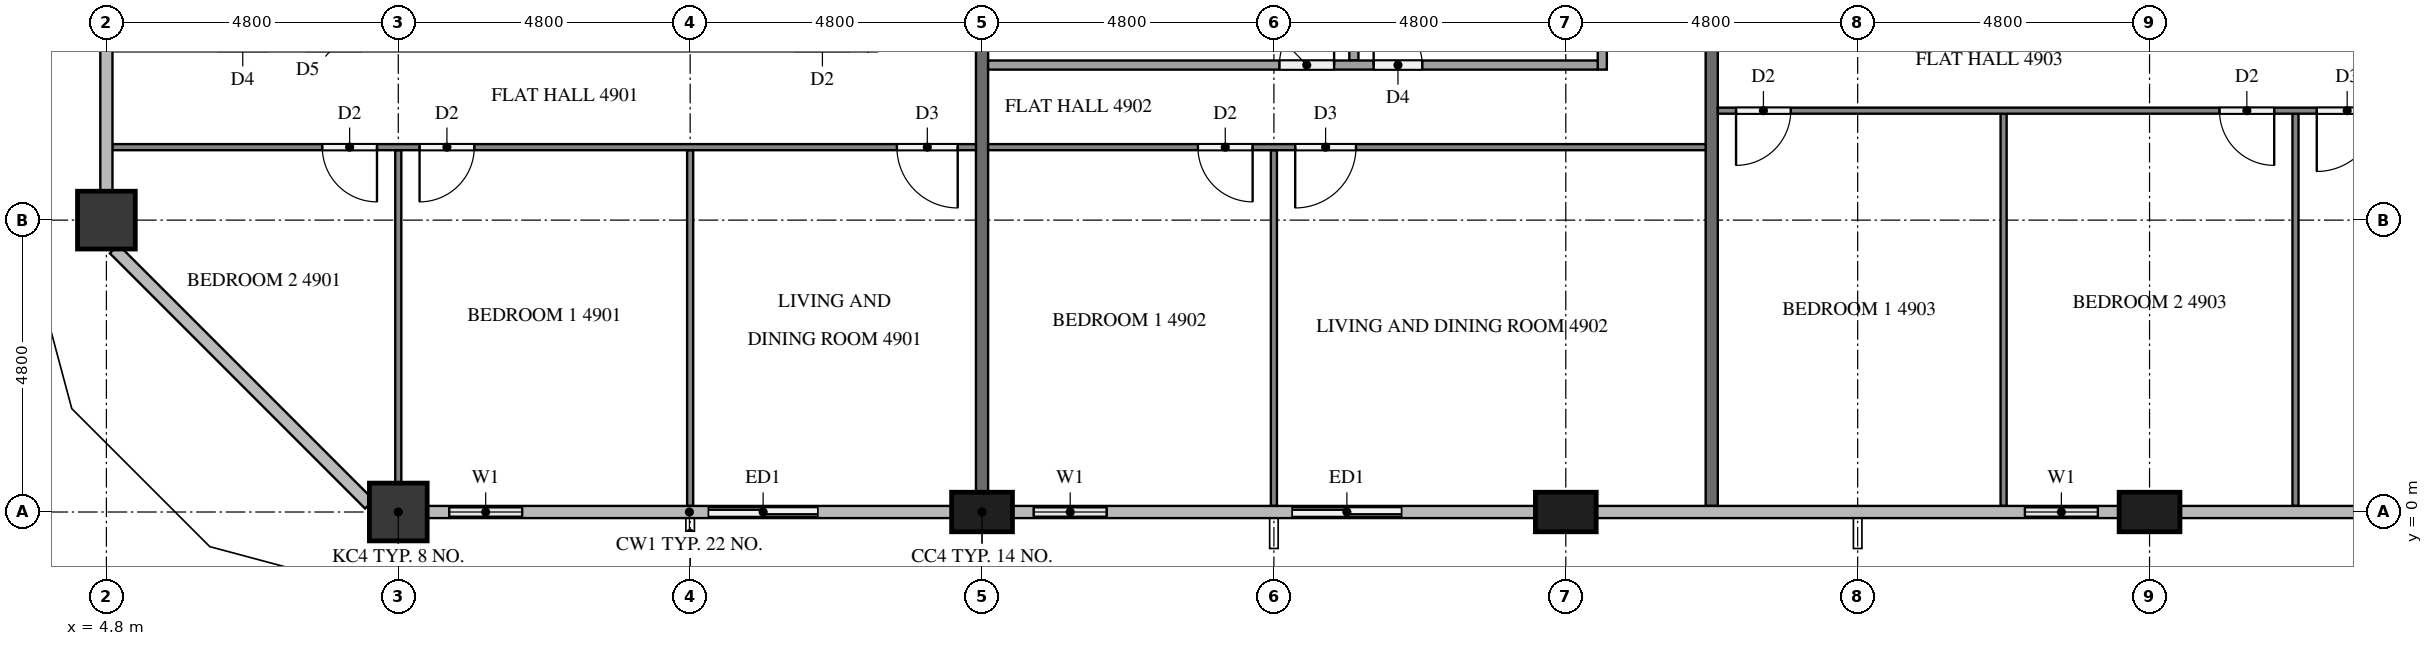
"""IFC4 building model, lengths in metres.
Left out: names, types, materials, properties, quantities, classifications, styles, units other than length and angle.
Written with IfcOpenShell. Run it as: python <this file> out.ifc"""

import sys

from ifc_helpers import new_model, si_unit, direction, frame, frame_2d, origin, origin_2d, place, context, subcontext, project, spatial, rectangle, extrude, element, fill, save


model = new_model("IFC4")
c1 = context("Model", 3, precision=1e-05, world=origin(), true_north=direction((0.0, 1.0)))
c2 = subcontext(c1, "Body", "Model", "MODEL_VIEW")
j1 = project(units=[si_unit("LENGTHUNIT", "METRE"), si_unit("PLANEANGLEUNIT", "RADIAN")], contexts=[c1])
p1 = place(None, origin())
s1 = spatial("IfcSite", under=j1, at=p1, CompositionType="ELEMENT")
p2 = place(p1, origin())
s2 = spatial("IfcBuilding", under=s1, at=p2, CompositionType="ELEMENT")
p3 = place(p2, frame((0.0, 0.0, 189.4)))
s3 = spatial("IfcBuildingStorey", under=s2, at=p3, CompositionType="ELEMENT", Elevation=189.4)
p4 = place(p3, frame((9.6, 0.0, 0.0), z_axis=(0.0, 0.0, 1.0), x_axis=(1.0, 0.0, 0.0)))
e1 = element("IfcColumn", 1, at=p4, inside=s3, PredefinedType="COLUMN", context=c2, shape_type="SweptSolid", body=[
    extrude(rectangle(XDim=0.95, YDim=0.95, at=origin_2d()), origin(), (0.0, 0.0, 1.0), 3.2),
])
for number, where, z_axis, x_axis in (
    (2, (19.2, 0.0, 0.0), (0.0, 0.0, 1.0), (1.0, 0.0, 0.0)),
    (3, (28.8, 0.0, 0.0), (0.0, 0.0, 1.0), (1.0, 0.0, 0.0)),
    (4, (38.4, 0.0, 0.0), (0.0, 0.0, 1.0), (1.0, 0.0, 0.0)),
):
    element("IfcColumn", number, at=place(p3, frame(where, z_axis=z_axis, x_axis=x_axis)), inside=s3, PredefinedType="COLUMN", context=c2, shape_type="SweptSolid", body=[
        extrude(rectangle(XDim=1.0, YDim=0.65, at=origin_2d()), origin(), (0.0, 0.0, 1.0), 3.2),
    ])
p5 = place(p3, frame((4.8, 4.8, 0.0), z_axis=(0.0, 0.0, 1.0), x_axis=(1.0, 0.0, 0.0)))
e5 = element("IfcColumn", 5, at=p5, inside=s3, PredefinedType="COLUMN", context=c2, shape_type="SweptSolid", body=[
    extrude(rectangle(XDim=0.95, YDim=0.95, at=origin_2d()), origin(), (0.0, 0.0, 1.0), 3.2),
])
p6 = place(p3, frame((10.075, 0.0, 0.0), z_axis=(0.0, 0.0, 1.0), x_axis=(1.0, 0.0, 0.0)))
e6 = element("IfcWall", 6, at=p6, inside=s3, PredefinedType="SOLIDWALL", context=c2, shape_type="SweptSolid", body=[
    extrude(rectangle(XDim=1.925, YDim=0.15, at=frame_2d((0.962, 0.0))), origin(), (0.0, 0.0, 1.0), 3.2),
])
p7 = place(p6, frame((0.363, 0.0, 0.9)))
e7 = element("IfcOpeningElement", 7, at=p7, cuts=e6, PredefinedType="OPENING", context=c2, shape_type="SweptSolid", body=[
    extrude(rectangle(XDim=1.2, YDim=1.4, at=frame_2d((0.6, 0.7))), frame((0.0, 0.085, 0.0), z_axis=(0.0, -1.0, 0.0), x_axis=(1.0, 0.0, 0.0)), (0.0, 0.0, 1.0), 0.17),
])
p8 = place(p3, frame((14.4, 0.0, 0.0), z_axis=(0.0, 0.0, 1.0), x_axis=(1.0, 0.0, 0.0)))
e8 = element("IfcWall", 8, at=p8, inside=s3, PredefinedType="SOLIDWALL", context=c2, shape_type="SweptSolid", body=[
    extrude(rectangle(XDim=2.4, YDim=0.15, at=frame_2d((1.2, 0.0))), origin(), (0.0, 0.0, 1.0), 3.2),
])
p9 = place(p8, frame((0.3, 0.0, 0.0)))
e9 = element("IfcOpeningElement", 9, at=p9, cuts=e8, PredefinedType="OPENING", context=c2, shape_type="SweptSolid", body=[
    extrude(rectangle(XDim=1.8, YDim=2.4, at=frame_2d((0.9, 1.2))), frame((0.0, 0.085, 0.0), z_axis=(0.0, -1.0, 0.0), x_axis=(1.0, 0.0, 0.0)), (0.0, 0.0, 1.0), 0.17),
])
p10 = place(p3, frame((19.7, 0.0, 0.0), z_axis=(0.0, 0.0, 1.0), x_axis=(1.0, 0.0, 0.0)))
e10 = element("IfcWall", 10, at=p10, inside=s3, PredefinedType="SOLIDWALL", context=c2, shape_type="SweptSolid", body=[
    extrude(rectangle(XDim=1.9, YDim=0.15, at=frame_2d((0.95, 0.0))), origin(), (0.0, 0.0, 1.0), 3.2),
])
p11 = place(p10, frame((0.35, 0.0, 0.9)))
e11 = element("IfcOpeningElement", 11, at=p11, cuts=e10, PredefinedType="OPENING", context=c2, shape_type="SweptSolid", body=[
    extrude(rectangle(XDim=1.2, YDim=1.4, at=frame_2d((0.6, 0.7))), frame((0.0, 0.085, 0.0), z_axis=(0.0, -1.0, 0.0), x_axis=(1.0, 0.0, 0.0)), (0.0, 0.0, 1.0), 0.17),
])
p12 = place(p3, frame((24.0, 0.0, 0.0), z_axis=(0.0, 0.0, 1.0), x_axis=(1.0, 0.0, 0.0)))
e12 = element("IfcWall", 12, at=p12, inside=s3, PredefinedType="SOLIDWALL", context=c2, shape_type="SweptSolid", body=[
    extrude(rectangle(XDim=2.4, YDim=0.15, at=frame_2d((1.2, 0.0))), origin(), (0.0, 0.0, 1.0), 3.2),
])
p13 = place(p12, frame((0.3, 0.0, 0.0)))
e13 = element("IfcOpeningElement", 13, at=p13, cuts=e12, PredefinedType="OPENING", context=c2, shape_type="SweptSolid", body=[
    extrude(rectangle(XDim=1.8, YDim=2.4, at=frame_2d((0.9, 1.2))), frame((0.0, 0.085, 0.0), z_axis=(0.0, -1.0, 0.0), x_axis=(1.0, 0.0, 0.0)), (0.0, 0.0, 1.0), 0.17),
])
p14 = place(p3, frame((36.0, 0.0, 0.0), z_axis=(0.0, 0.0, 1.0), x_axis=(1.0, 0.0, 0.0)))
e14 = element("IfcWall", 14, at=p14, inside=s3, PredefinedType="SOLIDWALL", context=c2, shape_type="SweptSolid", body=[
    extrude(rectangle(XDim=1.9, YDim=0.15, at=frame_2d((0.95, 0.0))), origin(), (0.0, 0.0, 1.0), 3.2),
])
p15 = place(p14, frame((0.35, 0.0, 0.9)))
e15 = element("IfcOpeningElement", 15, at=p15, cuts=e14, PredefinedType="OPENING", context=c2, shape_type="SweptSolid", body=[
    extrude(rectangle(XDim=1.2, YDim=1.4, at=frame_2d((0.6, 0.7))), frame((0.0, 0.085, 0.0), z_axis=(0.0, -1.0, 0.0), x_axis=(1.0, 0.0, 0.0)), (0.0, 0.0, 1.0), 0.17),
])
p16 = place(p3, frame((19.2, 11.9, 0.0), z_axis=(0.0, 0.0, 1.0), x_axis=(0.0, -1.0, 0.0)))
e16 = element("IfcWall", 16, at=p16, inside=s3, PredefinedType="PARTITIONING", context=c2, shape_type="SweptSolid", body=[
    extrude(rectangle(XDim=11.575, YDim=0.2, at=frame_2d((5.788, 0.0))), origin(), (0.0, 0.0, 1.0), 3.2),
])
p17 = place(p3, frame((31.2, 11.9, 0.0), z_axis=(0.0, 0.0, 1.0), x_axis=(0.0, -1.0, 0.0)))
e17 = element("IfcWall", 17, at=p17, inside=s3, PredefinedType="PARTITIONING", context=c2, shape_type="SweptSolid", body=[
    extrude(rectangle(XDim=11.8, YDim=0.2, at=frame_2d((5.9, 0.0))), origin(), (0.0, 0.0, 1.0), 3.2),
])
p18 = place(p3, frame((14.4, 5.95, 0.0), z_axis=(0.0, 0.0, 1.0), x_axis=(0.0, -1.0, 0.0)))
e18 = element("IfcWall", 18, at=p18, inside=s3, PredefinedType="PARTITIONING", context=c2, shape_type="SweptSolid", body=[
    extrude(rectangle(XDim=5.85, YDim=0.1, at=frame_2d((2.925, 0.0))), origin(), (0.0, 0.0, 1.0), 3.2),
])
p19 = place(p3, frame((9.6, 5.95, 0.0), z_axis=(0.0, 0.0, 1.0), x_axis=(0.0, -1.0, 0.0)))
e19 = element("IfcWall", 19, at=p19, inside=s3, PredefinedType="PARTITIONING", context=c2, shape_type="SweptSolid", body=[
    extrude(rectangle(XDim=5.475, YDim=0.1, at=frame_2d((2.737, 0.0))), origin(), (0.0, 0.0, 1.0), 3.2),
])
p20 = place(p3, frame((19.1, 6.0, 0.0), z_axis=(0.0, 0.0, 1.0), x_axis=(-1.0, 0.0, 0.0)))
e20 = element("IfcWall", 20, at=p20, inside=s3, PredefinedType="PARTITIONING", context=c2, shape_type="SweptSolid", body=[
    extrude(rectangle(XDim=14.2, YDim=0.1, at=frame_2d((7.1, 0.0))), origin(), (0.0, 0.0, 1.0), 3.2),
])
p21 = place(p20, frame((0.3, 0.0, 0.0)))
e21 = element("IfcOpeningElement", 21, at=p21, cuts=e20, PredefinedType="OPENING", context=c2, shape_type="SweptSolid", body=[
    extrude(rectangle(XDim=1.0, YDim=2.1, at=frame_2d((0.5, 1.05))), frame((0.0, 0.06, 0.0), z_axis=(0.0, -1.0, 0.0), x_axis=(1.0, 0.0, 0.0)), (0.0, 0.0, 1.0), 0.12),
])
p22 = place(p20, frame((8.25, 0.0, 0.0)))
e22 = element("IfcOpeningElement", 22, at=p22, cuts=e20, PredefinedType="OPENING", context=c2, shape_type="SweptSolid", body=[
    extrude(rectangle(XDim=0.9, YDim=2.1, at=frame_2d((0.45, 1.05))), frame((0.0, 0.06, 0.0), z_axis=(0.0, -1.0, 0.0), x_axis=(1.0, 0.0, 0.0)), (0.0, 0.0, 1.0), 0.12),
])
p23 = place(p20, frame((9.85, 0.0, 0.0)))
e23 = element("IfcOpeningElement", 23, at=p23, cuts=e20, PredefinedType="OPENING", context=c2, shape_type="SweptSolid", body=[
    extrude(rectangle(XDim=0.9, YDim=2.1, at=frame_2d((0.45, 1.05))), frame((0.0, 0.06, 0.0), z_axis=(0.0, -1.0, 0.0), x_axis=(1.0, 0.0, 0.0)), (0.0, 0.0, 1.0), 0.12),
])
p24 = place(p3, frame((24.0, 5.95, 0.0), z_axis=(0.0, 0.0, 1.0), x_axis=(0.0, -1.0, 0.0)))
e24 = element("IfcWall", 24, at=p24, inside=s3, PredefinedType="PARTITIONING", context=c2, shape_type="SweptSolid", body=[
    extrude(rectangle(XDim=5.85, YDim=0.1, at=frame_2d((2.925, 0.0))), origin(), (0.0, 0.0, 1.0), 3.2),
])
p25 = place(p3, frame((31.1, 6.0, 0.0), z_axis=(0.0, 0.0, 1.0), x_axis=(-1.0, 0.0, 0.0)))
e25 = element("IfcWall", 25, at=p25, inside=s3, PredefinedType="PARTITIONING", context=c2, shape_type="SweptSolid", body=[
    extrude(rectangle(XDim=11.8, YDim=0.1, at=frame_2d((5.9, 0.0))), origin(), (0.0, 0.0, 1.0), 3.2),
])
p26 = place(p25, frame((5.75, 0.0, 0.0)))
e26 = element("IfcOpeningElement", 26, at=p26, cuts=e25, PredefinedType="OPENING", context=c2, shape_type="SweptSolid", body=[
    extrude(rectangle(XDim=1.0, YDim=2.1, at=frame_2d((0.5, 1.05))), frame((0.0, 0.06, 0.0), z_axis=(0.0, -1.0, 0.0), x_axis=(1.0, 0.0, 0.0)), (0.0, 0.0, 1.0), 0.12),
])
p27 = place(p25, frame((7.45, 0.0, 0.0)))
e27 = element("IfcOpeningElement", 27, at=p27, cuts=e25, PredefinedType="OPENING", context=c2, shape_type="SweptSolid", body=[
    extrude(rectangle(XDim=0.9, YDim=2.1, at=frame_2d((0.45, 1.05))), frame((0.0, 0.06, 0.0), z_axis=(0.0, -1.0, 0.0), x_axis=(1.0, 0.0, 0.0)), (0.0, 0.0, 1.0), 0.12),
])
p28 = place(p3, frame((25.315, 11.9, 0.0), z_axis=(0.0, 0.0, 1.0), x_axis=(0.0, -1.0, 0.0)))
e28 = element("IfcWall", 28, at=p28, inside=s3, PredefinedType="PARTITIONING", context=c2, shape_type="SweptSolid", body=[
    extrude(rectangle(XDim=4.475, YDim=0.15, at=frame_2d((2.237, 0.0))), origin(), (0.0, 0.0, 1.0), 3.2),
])
p29 = place(p3, frame((29.4, 11.9, 0.0), z_axis=(0.0, 0.0, 1.0), x_axis=(0.0, -1.0, 0.0)))
e29 = element("IfcWall", 29, at=p29, inside=s3, PredefinedType="PARTITIONING", context=c2, shape_type="SweptSolid", body=[
    extrude(rectangle(XDim=4.625, YDim=0.15, at=frame_2d((2.312, 0.0))), origin(), (0.0, 0.0, 1.0), 3.2),
])
p30 = place(p3, frame((19.3, 7.35, 0.0), z_axis=(0.0, 0.0, 1.0), x_axis=(1.0, 0.0, 0.0)))
e30 = element("IfcWall", 30, at=p30, inside=s3, PredefinedType="PARTITIONING", context=c2, shape_type="SweptSolid", body=[
    extrude(rectangle(XDim=10.025, YDim=0.15, at=frame_2d((5.012, 0.0))), origin(), (0.0, 0.0, 1.0), 3.2),
])
p31 = place(p30, frame((6.34, 0.0, 0.0)))
e31 = element("IfcOpeningElement", 31, at=p31, cuts=e30, PredefinedType="OPENING", context=c2, shape_type="SweptSolid", body=[
    extrude(rectangle(XDim=0.8, YDim=2.1, at=frame_2d((0.4, 1.05))), frame((0.0, 0.085, 0.0), z_axis=(0.0, -1.0, 0.0), x_axis=(1.0, 0.0, 0.0)), (0.0, 0.0, 1.0), 0.17),
])
p32 = place(p30, frame((4.79, 0.0, 0.0)))
e32 = element("IfcOpeningElement", 32, at=p32, cuts=e30, PredefinedType="OPENING", context=c2, shape_type="SweptSolid", body=[
    extrude(rectangle(XDim=0.9, YDim=2.1, at=frame_2d((0.45, 1.05))), frame((0.0, 0.085, 0.0), z_axis=(0.0, -1.0, 0.0), x_axis=(1.0, 0.0, 0.0)), (0.0, 0.0, 1.0), 0.17),
])
for number, where, z_axis, x_axis in (
    (33, (36.0, 6.55, 0.0), (0.0, 0.0, 1.0), (0.0, -1.0, 0.0)),
    (34, (40.8, 6.55, 0.0), (0.0, 0.0, 1.0), (0.0, -1.0, 0.0)),
):
    element("IfcWall", number, at=place(p3, frame(where, z_axis=z_axis, x_axis=x_axis)), inside=s3, PredefinedType="PARTITIONING", context=c2, shape_type="SweptSolid", body=[
        extrude(rectangle(XDim=6.45, YDim=0.1, at=frame_2d((3.225, 0.0))), origin(), (0.0, 0.0, 1.0), 3.2),
    ])
p33 = place(p3, frame((45.5, 6.6, 0.0), z_axis=(0.0, 0.0, 1.0), x_axis=(-1.0, 0.0, 0.0)))
e35 = element("IfcWall", 35, at=p33, inside=s3, PredefinedType="PARTITIONING", context=c2, shape_type="SweptSolid", body=[
    extrude(rectangle(XDim=14.2, YDim=0.1, at=frame_2d((7.1, 0.0))), origin(), (0.0, 0.0, 1.0), 3.2),
])
p34 = place(p33, frame((13.0, 0.0, 0.0)))
e36 = element("IfcOpeningElement", 36, at=p34, cuts=e35, PredefinedType="OPENING", context=c2, shape_type="SweptSolid", body=[
    extrude(rectangle(XDim=0.9, YDim=2.1, at=frame_2d((0.45, 1.05))), frame((0.0, 0.06, 0.0), z_axis=(0.0, -1.0, 0.0), x_axis=(1.0, 0.0, 0.0)), (0.0, 0.0, 1.0), 0.12),
])
p35 = place(p33, frame((5.05, 0.0, 0.0)))
e37 = element("IfcOpeningElement", 37, at=p35, cuts=e35, PredefinedType="OPENING", context=c2, shape_type="SweptSolid", body=[
    extrude(rectangle(XDim=0.9, YDim=2.1, at=frame_2d((0.45, 1.05))), frame((0.0, 0.06, 0.0), z_axis=(0.0, -1.0, 0.0), x_axis=(1.0, 0.0, 0.0)), (0.0, 0.0, 1.0), 0.12),
])
p36 = place(p33, frame((3.35, 0.0, 0.0)))
e38 = element("IfcOpeningElement", 38, at=p36, cuts=e35, PredefinedType="OPENING", context=c2, shape_type="SweptSolid", body=[
    extrude(rectangle(XDim=1.0, YDim=2.1, at=frame_2d((0.5, 1.05))), frame((0.0, 0.06, 0.0), z_axis=(0.0, -1.0, 0.0), x_axis=(1.0, 0.0, 0.0)), (0.0, 0.0, 1.0), 0.12),
])
p37 = place(p7, origin())
e39 = element("IfcWindow", 39, at=p37, inside=s3, PartitioningType="SINGLE_PANEL", PredefinedType="WINDOW", context=c2, shape_type="SweptSolid", body=[
    extrude(rectangle(XDim=1.2, YDim=1.4, at=frame_2d((0.6, 0.7))), frame((0.0, 0.03, 0.0), z_axis=(0.0, -1.0, 0.0), x_axis=(1.0, 0.0, 0.0)), (0.0, 0.0, 1.0), 0.06),
])
fill(e7, e39)
p38 = place(p9, origin())
e40 = element("IfcDoor", 40, at=p38, inside=s3, OperationType="SLIDING_TO_LEFT", PredefinedType="DOOR", context=c2, shape_type="SweptSolid", body=[
    extrude(rectangle(XDim=1.8, YDim=2.4, at=frame_2d((0.9, 1.2))), frame((0.0, 0.025, 0.0), z_axis=(0.0, -1.0, 0.0), x_axis=(1.0, 0.0, 0.0)), (0.0, 0.0, 1.0), 0.05),
])
fill(e9, e40)
p39 = place(p11, origin())
e41 = element("IfcWindow", 41, at=p39, inside=s3, PartitioningType="SINGLE_PANEL", PredefinedType="WINDOW", context=c2, shape_type="SweptSolid", body=[
    extrude(rectangle(XDim=1.2, YDim=1.4, at=frame_2d((0.6, 0.7))), frame((0.0, 0.03, 0.0), z_axis=(0.0, -1.0, 0.0), x_axis=(1.0, 0.0, 0.0)), (0.0, 0.0, 1.0), 0.06),
])
fill(e11, e41)
p40 = place(p13, origin())
e42 = element("IfcDoor", 42, at=p40, inside=s3, OperationType="SLIDING_TO_RIGHT", PredefinedType="DOOR", context=c2, shape_type="SweptSolid", body=[
    extrude(rectangle(XDim=1.8, YDim=2.4, at=frame_2d((0.9, 1.2))), frame((0.0, 0.025, 0.0), z_axis=(0.0, -1.0, 0.0), x_axis=(1.0, 0.0, 0.0)), (0.0, 0.0, 1.0), 0.05),
])
fill(e13, e42)
p41 = place(p15, origin())
e43 = element("IfcWindow", 43, at=p41, inside=s3, PartitioningType="SINGLE_PANEL", PredefinedType="WINDOW", context=c2, shape_type="SweptSolid", body=[
    extrude(rectangle(XDim=1.2, YDim=1.4, at=frame_2d((0.6, 0.7))), frame((0.0, 0.03, 0.0), z_axis=(0.0, -1.0, 0.0), x_axis=(1.0, 0.0, 0.0)), (0.0, 0.0, 1.0), 0.06),
])
fill(e15, e43)
p42 = place(p21, origin())
e44 = element("IfcDoor", 44, at=p42, inside=s3, OperationType="SINGLE_SWING_LEFT", PredefinedType="DOOR", context=c2, shape_type="SweptSolid", body=[
    extrude(rectangle(XDim=1.0, YDim=2.1, at=frame_2d((0.5, 1.05))), frame((0.0, 0.025, 0.0), z_axis=(0.0, -1.0, 0.0), x_axis=(1.0, 0.0, 0.0)), (0.0, 0.0, 1.0), 0.05),
])
fill(e21, e44)
p43 = place(p22, origin())
e45 = element("IfcDoor", 45, at=p43, inside=s3, OperationType="SINGLE_SWING_RIGHT", PredefinedType="DOOR", context=c2, shape_type="SweptSolid", body=[
    extrude(rectangle(XDim=0.9, YDim=2.1, at=frame_2d((0.45, 1.05))), frame((0.0, 0.025, 0.0), z_axis=(0.0, -1.0, 0.0), x_axis=(1.0, 0.0, 0.0)), (0.0, 0.0, 1.0), 0.05),
])
fill(e22, e45)
p44 = place(p23, origin())
e46 = element("IfcDoor", 46, at=p44, inside=s3, OperationType="SINGLE_SWING_LEFT", PredefinedType="DOOR", context=c2, shape_type="SweptSolid", body=[
    extrude(rectangle(XDim=0.9, YDim=2.1, at=frame_2d((0.45, 1.05))), frame((0.0, 0.025, 0.0), z_axis=(0.0, -1.0, 0.0), x_axis=(1.0, 0.0, 0.0)), (0.0, 0.0, 1.0), 0.05),
])
fill(e23, e46)
p45 = place(p26, origin())
e47 = element("IfcDoor", 47, at=p45, inside=s3, OperationType="SINGLE_SWING_RIGHT", PredefinedType="DOOR", context=c2, shape_type="SweptSolid", body=[
    extrude(rectangle(XDim=1.0, YDim=2.1, at=frame_2d((0.5, 1.05))), frame((0.0, 0.025, 0.0), z_axis=(0.0, -1.0, 0.0), x_axis=(1.0, 0.0, 0.0)), (0.0, 0.0, 1.0), 0.05),
])
fill(e26, e47)
p46 = place(p27, origin())
e48 = element("IfcDoor", 48, at=p46, inside=s3, OperationType="SINGLE_SWING_LEFT", PredefinedType="DOOR", context=c2, shape_type="SweptSolid", body=[
    extrude(rectangle(XDim=0.9, YDim=2.1, at=frame_2d((0.45, 1.05))), frame((0.0, 0.025, 0.0), z_axis=(0.0, -1.0, 0.0), x_axis=(1.0, 0.0, 0.0)), (0.0, 0.0, 1.0), 0.05),
])
fill(e27, e48)
p47 = place(p31, origin())
e49 = element("IfcDoor", 49, at=p47, inside=s3, OperationType="SINGLE_SWING_LEFT", PredefinedType="DOOR", context=c2, shape_type="SweptSolid", body=[
    extrude(rectangle(XDim=0.8, YDim=2.1, at=frame_2d((0.4, 1.05))), frame((0.0, 0.025, 0.0), z_axis=(0.0, -1.0, 0.0), x_axis=(1.0, 0.0, 0.0)), (0.0, 0.0, 1.0), 0.05),
])
fill(e31, e49)
p48 = place(p32, origin())
e50 = element("IfcDoor", 50, at=p48, inside=s3, OperationType="SINGLE_SWING_RIGHT", PredefinedType="DOOR", context=c2, shape_type="SweptSolid", body=[
    extrude(rectangle(XDim=0.9, YDim=2.1, at=frame_2d((0.45, 1.05))), frame((0.0, 0.025, 0.0), z_axis=(0.0, -1.0, 0.0), x_axis=(1.0, 0.0, 0.0)), (0.0, 0.0, 1.0), 0.05),
])
fill(e32, e50)
p49 = place(p34, origin())
e51 = element("IfcDoor", 51, at=p49, inside=s3, OperationType="SINGLE_SWING_RIGHT", PredefinedType="DOOR", context=c2, shape_type="SweptSolid", body=[
    extrude(rectangle(XDim=0.9, YDim=2.1, at=frame_2d((0.45, 1.05))), frame((0.0, 0.025, 0.0), z_axis=(0.0, -1.0, 0.0), x_axis=(1.0, 0.0, 0.0)), (0.0, 0.0, 1.0), 0.05),
])
fill(e36, e51)
p50 = place(p35, origin())
e52 = element("IfcDoor", 52, at=p50, inside=s3, OperationType="SINGLE_SWING_LEFT", PredefinedType="DOOR", context=c2, shape_type="SweptSolid", body=[
    extrude(rectangle(XDim=0.9, YDim=2.1, at=frame_2d((0.45, 1.05))), frame((0.0, 0.025, 0.0), z_axis=(0.0, -1.0, 0.0), x_axis=(1.0, 0.0, 0.0)), (0.0, 0.0, 1.0), 0.05),
])
fill(e37, e52)
p51 = place(p36, origin())
e53 = element("IfcDoor", 53, at=p51, inside=s3, OperationType="SINGLE_SWING_RIGHT", PredefinedType="DOOR", context=c2, shape_type="SweptSolid", body=[
    extrude(rectangle(XDim=1.0, YDim=2.1, at=frame_2d((0.5, 1.05))), frame((0.0, 0.025, 0.0), z_axis=(0.0, -1.0, 0.0), x_axis=(1.0, 0.0, 0.0)), (0.0, 0.0, 1.0), 0.05),
])
fill(e38, e53)
save(model, sys.argv[1])
